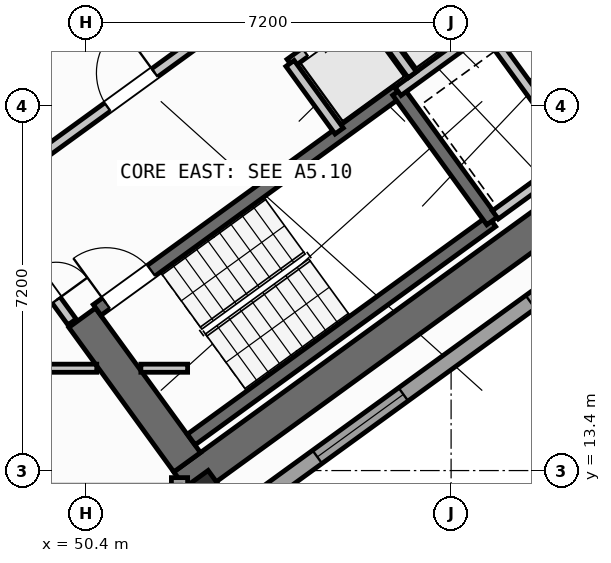
"""IFC4 building model, lengths in metres.
Left out: names, types, materials, properties, quantities, classifications, styles, units other than length and angle.
Written with IfcOpenShell. Run it as: python <this file> out.ifc"""

import sys

from ifc_helpers import new_model, si_unit, direction, frame, frame_2d, origin, origin_2d, place, context, subcontext, project, spatial, rectangle, hollow_rectangle, extrude, source, transform, mapped, element, fill, save


model = new_model("IFC4")
c1 = context("Model", 3, precision=1e-05, world=origin(), true_north=direction((0.0, 1.0)))
c2 = subcontext(c1, "Body", "Model", "MODEL_VIEW")
j1 = project(units=[si_unit("LENGTHUNIT", "METRE"), si_unit("PLANEANGLEUNIT", "RADIAN")], contexts=[c1])
p1 = place(None, origin())
s1 = spatial("IfcSite", under=j1, at=p1, CompositionType="ELEMENT")
p2 = place(p1, origin())
s2 = spatial("IfcBuilding", under=s1, at=p2, CompositionType="ELEMENT")
p3 = place(p2, frame((0.0, 0.0, 90.0)))
s3 = spatial("IfcBuildingStorey", under=s2, at=p3, CompositionType="ELEMENT", Elevation=90.0)
p4 = place(p3, frame((52.318, 13.11, 0.0), z_axis=(0.0, 0.0, 1.0), x_axis=(0.809019445368, 0.587781878776, 0.0)))
e1 = element("IfcWall", 1, at=p4, inside=s3, PredefinedType="SHEAR", context=c2, shape_type="SweptSolid", body=[
    extrude(rectangle(XDim=12.44, YDim=0.65, at=frame_2d((6.22, 0.0))), origin(), (0.0, 0.0, 1.0), 3.35),
])
p5 = place(p3, frame((52.39, 13.564, 0.0), z_axis=(0.0, 0.0, 1.0), x_axis=(-0.58779688989, 0.809008539037, 0.0)))
e2 = element("IfcWall", 2, at=p5, inside=s3, PredefinedType="SHEAR", context=c2, shape_type="SweptSolid", body=[
    extrude(rectangle(XDim=3.525, YDim=0.65, at=frame_2d((1.763, 0.0))), origin(), (0.0, 0.0, 1.0), 3.35),
])
m1 = source(origin(), c2, "Body", "SweptSolid", [
    extrude(hollow_rectangle(XDim=0.9, YDim=0.9, WallThickness=0.036, at=origin_2d()), origin(), (0.0, 0.0, 1.0), 3.6),
])
p6 = place(p3, frame((52.705, 12.773, 0.0), z_axis=(0.0, 0.0, 1.0), x_axis=(0.809016994375, 0.587785252292, 0.0)))
e3 = element("IfcColumn", 3, at=p6, inside=s3, PredefinedType="COLUMN", context=c2, shape_type="MappedRepresentation", body=[
    mapped(m1, transform((0.0, 0.0, 0.0), scale=1.0)),
])
p7 = place(p3, frame((67.454, 22.747, 0.0), z_axis=(0.0, 0.0, 1.0), x_axis=(-0.809021120468, -0.587779573171, 0.0)))
e4 = element("IfcWall", 4, at=p7, inside=s3, PredefinedType="STANDARD", context=c2, shape_type="SweptSolid", body=[
    extrude(rectangle(XDim=17.588, YDim=0.32, at=frame_2d((8.794, 0.0))), origin(), (0.0, 0.0, 1.0), 3.35),
])
p8 = place(p7, frame((1.624, 0.0, 0.0)))
e5 = element("IfcOpeningElement", 5, at=p8, cuts=e4, PredefinedType="OPENING", context=c2, shape_type="SweptSolid", body=[
    extrude(rectangle(XDim=1.05, YDim=2.15, at=frame_2d((0.525, 1.075))), frame((0.0, 0.17, 0.0), z_axis=(0.0, -1.0, 0.0), x_axis=(1.0, 0.0, 0.0)), (0.0, 0.0, 1.0), 0.34),
])
p9 = place(p7, frame((8.144, 0.0, 0.8)))
e6 = element("IfcOpeningElement", 6, at=p9, cuts=e4, PredefinedType="OPENING", context=c2, shape_type="SweptSolid", body=[
    extrude(rectangle(XDim=2.1, YDim=1.55, at=frame_2d((1.05, 0.775))), frame((0.0, 0.17, 0.0), z_axis=(0.0, -1.0, 0.0), x_axis=(1.0, 0.0, 0.0)), (0.0, 0.0, 1.0), 0.34),
])
p10 = place(p7, frame((13.344, 0.0, 0.8)))
e7 = element("IfcOpeningElement", 7, at=p10, cuts=e4, PredefinedType="OPENING", context=c2, shape_type="SweptSolid", body=[
    extrude(rectangle(XDim=2.1, YDim=1.55, at=frame_2d((1.05, 0.775))), frame((0.0, 0.17, 0.0), z_axis=(0.0, -1.0, 0.0), x_axis=(1.0, 0.0, 0.0)), (0.0, 0.0, 1.0), 0.34),
])
p11 = place(p3, frame((52.24, 13.261, 0.0), z_axis=(0.0, 0.0, 1.0), x_axis=(0.0, -1.0, 0.0)))
e8 = element("IfcWall", 8, at=p11, inside=s3, PredefinedType="STANDARD", context=c2, shape_type="SweptSolid", body=[
    extrude(rectangle(XDim=9.795, YDim=0.32, at=frame_2d((4.897, 0.0))), origin(), (0.0, 0.0, 1.0), 3.35),
])
p12 = place(p11, frame((2.307, 0.0, 0.8)))
e9 = element("IfcOpeningElement", 9, at=p12, cuts=e8, PredefinedType="OPENING", context=c2, shape_type="SweptSolid", body=[
    extrude(rectangle(XDim=2.1, YDim=1.55, at=frame_2d((1.05, 0.775))), frame((0.0, 0.17, 0.0), z_axis=(0.0, -1.0, 0.0), x_axis=(1.0, 0.0, 0.0)), (0.0, 0.0, 1.0), 0.34),
])
p13 = place(p11, frame((7.03, 0.0, 0.85)))
e10 = element("IfcOpeningElement", 10, at=p13, cuts=e8, PredefinedType="OPENING", context=c2, shape_type="SweptSolid", body=[
    extrude(rectangle(XDim=1.8, YDim=1.5, at=frame_2d((0.9, 0.75))), frame((0.0, 0.17, 0.0), z_axis=(0.0, -1.0, 0.0), x_axis=(1.0, 0.0, 0.0)), (0.0, 0.0, 1.0), 0.34),
])
p14 = place(p3, frame((52.472, 14.013, 0.0), z_axis=(0.0, 0.0, 1.0), x_axis=(0.809028366311, 0.587769599847, 0.0)))
e11 = element("IfcWall", 11, at=p14, inside=s3, PredefinedType="SHEAR", context=c2, shape_type="SweptSolid", body=[
    extrude(rectangle(XDim=7.33, YDim=0.26, at=frame_2d((3.665, 0.0))), origin(), (0.0, 0.0, 1.0), 3.35),
])
p15 = place(p3, frame((50.615, 16.57, 0.0), z_axis=(0.0, 0.0, 1.0), x_axis=(0.809028366311, 0.587769599847, 0.0)))
e12 = element("IfcWall", 12, at=p15, inside=s3, PredefinedType="SHEAR", context=c2, shape_type="SweptSolid", body=[
    extrude(rectangle(XDim=7.33, YDim=0.26, at=frame_2d((3.665, 0.0))), origin(), (0.0, 0.0, 1.0), 3.35),
])
p16 = place(p15, frame((0.22, 0.0, 0.0)))
e13 = element("IfcOpeningElement", 13, at=p16, cuts=e12, PredefinedType="OPENING", context=c2, shape_type="SweptSolid", body=[
    extrude(rectangle(XDim=1.1, YDim=2.1, at=frame_2d((0.55, 1.05))), frame((0.0, 0.14, 0.0), z_axis=(0.0, -1.0, 0.0), x_axis=(1.0, 0.0, 0.0)), (0.0, 0.0, 1.0), 0.28),
])
p17 = place(p3, frame((58.41, 18.327, 0.0), z_axis=(0.0, 0.0, 1.0), x_axis=(-0.58776738483, 0.809029975545, 0.0)))
e14 = element("IfcWall", 14, at=p17, inside=s3, PredefinedType="SHEAR", context=c2, shape_type="SweptSolid", body=[
    extrude(rectangle(XDim=3.16, YDim=0.26, at=frame_2d((1.58, 0.0))), origin(), (0.0, 0.0, 1.0), 3.35),
])
p18 = place(p3, frame((47.106, 21.437, 0.0), z_axis=(0.0, 0.0, 1.0), x_axis=(0.809012514015, 0.58779141893, 0.0)))
e15 = element("IfcWall", 15, at=p18, inside=s3, PredefinedType="STANDARD", context=c2, shape_type="SweptSolid", body=[
    extrude(rectangle(XDim=3.398, YDim=0.2, at=frame_2d((1.699, 0.0))), origin(), (0.0, 0.0, 1.0), 3.34),
])
p19 = place(p18, frame((0.408, 0.0, 0.0)))
e16 = element("IfcOpeningElement", 16, at=p19, cuts=e15, PredefinedType="OPENING", context=c2, shape_type="SweptSolid", body=[
    extrude(rectangle(XDim=1.3, YDim=2.2, at=frame_2d((0.65, 1.1))), frame((0.0, 0.11, 0.0), z_axis=(0.0, -1.0, 0.0), x_axis=(1.0, 0.0, 0.0)), (0.0, 0.0, 1.0), 0.22),
])
p20 = place(p3, frame((48.799, 19.107, 0.0), z_axis=(0.0, 0.0, 1.0), x_axis=(0.809012959416, 0.587790805897, 0.0)))
e17 = element("IfcWall", 17, at=p20, inside=s3, PredefinedType="STANDARD", context=c2, shape_type="SweptSolid", body=[
    extrude(rectangle(XDim=5.718, YDim=0.2, at=frame_2d((2.859, 0.0))), origin(), (0.0, 0.0, 1.0), 3.34),
])
p21 = place(p20, frame((2.498, 0.0, 0.0)))
e18 = element("IfcOpeningElement", 18, at=p21, cuts=e17, PredefinedType="OPENING", context=c2, shape_type="SweptSolid", body=[
    extrude(rectangle(XDim=1.15, YDim=2.1, at=frame_2d((0.575, 1.05))), frame((0.0, 0.11, 0.0), z_axis=(0.0, -1.0, 0.0), x_axis=(1.0, 0.0, 0.0)), (0.0, 0.0, 1.0), 0.22),
])
p22 = place(p3, frame((56.553, 20.884, 0.0), z_axis=(0.0, 0.0, 1.0), x_axis=(0.809035789462, 0.587759382205, 0.0)))
e19 = element("IfcWall", 19, at=p22, inside=s3, PredefinedType="STANDARD", context=c2, shape_type="SweptSolid", body=[
    extrude(rectangle(XDim=3.768, YDim=0.2, at=frame_2d((1.884, 0.0))), origin(), (0.0, 0.0, 1.0), 3.34),
])
p23 = place(p22, frame((2.65, 0.0, 0.0)))
e20 = element("IfcOpeningElement", 20, at=p23, cuts=e19, PredefinedType="OPENING", context=c2, shape_type="SweptSolid", body=[
    extrude(rectangle(XDim=0.86, YDim=2.05, at=frame_2d((0.43, 1.025))), frame((0.0, 0.11, 0.0), z_axis=(0.0, -1.0, 0.0), x_axis=(1.0, 0.0, 0.0)), (0.0, 0.0, 1.0), 0.22),
])
p24 = place(p3, frame((54.421, 21.436, 0.0), z_axis=(0.0, 0.0, 1.0), x_axis=(0.809013710463, 0.587789772183, 0.0)))
e21 = element("IfcWall", 21, at=p24, inside=s3, PredefinedType="STANDARD", context=c2, shape_type="SweptSolid", body=[
    extrude(rectangle(XDim=5.36, YDim=0.2, at=frame_2d((2.68, 0.0))), origin(), (0.0, 0.0, 1.0), 3.34),
])
p25 = place(p24, frame((0.37, 0.0, 0.0)))
e22 = element("IfcOpeningElement", 22, at=p25, cuts=e21, PredefinedType="OPENING", context=c2, shape_type="SweptSolid", body=[
    extrude(rectangle(XDim=1.1, YDim=2.15, at=frame_2d((0.55, 1.075))), frame((0.0, 0.11, 0.0), z_axis=(0.0, -1.0, 0.0), x_axis=(1.0, 0.0, 0.0)), (0.0, 0.0, 1.0), 0.22),
])
p26 = place(p24, frame((2.17, 0.0, 0.0)))
e23 = element("IfcOpeningElement", 23, at=p26, cuts=e21, PredefinedType="OPENING", context=c2, shape_type="SweptSolid", body=[
    extrude(rectangle(XDim=1.1, YDim=2.15, at=frame_2d((0.55, 1.075))), frame((0.0, 0.11, 0.0), z_axis=(0.0, -1.0, 0.0), x_axis=(1.0, 0.0, 0.0)), (0.0, 0.0, 1.0), 0.22),
])
p27 = place(p24, frame((3.97, 0.0, 0.0)))
e24 = element("IfcOpeningElement", 24, at=p27, cuts=e21, PredefinedType="OPENING", context=c2, shape_type="SweptSolid", body=[
    extrude(rectangle(XDim=1.1, YDim=2.15, at=frame_2d((0.55, 1.075))), frame((0.0, 0.11, 0.0), z_axis=(0.0, -1.0, 0.0), x_axis=(1.0, 0.0, 0.0)), (0.0, 0.0, 1.0), 0.22),
])
p28 = place(p3, frame((55.391, 20.102, 0.0), z_axis=(0.0, 0.0, 1.0), x_axis=(-0.58778447739, 0.809017557374, 0.0)))
e25 = element("IfcWall", 25, at=p28, inside=s3, PredefinedType="STANDARD", context=c2, shape_type="SweptSolid", body=[
    extrude(rectangle(XDim=1.65, YDim=0.2, at=frame_2d((0.825, 0.0))), origin(), (0.0, 0.0, 1.0), 3.34),
])
p29 = place(p3, frame((56.834, 21.212, 0.0), z_axis=(0.0, 0.0, 1.0), x_axis=(-0.58776738483, 0.809029975545, 0.0)))
e26 = element("IfcWall", 26, at=p29, inside=s3, PredefinedType="STANDARD", context=c2, shape_type="SweptSolid", body=[
    extrude(rectangle(XDim=1.58, YDim=0.2, at=frame_2d((0.79, 0.0))), origin(), (0.0, 0.0, 1.0), 3.34),
])
p30 = place(p3, frame((60.067, 19.655, 0.0), z_axis=(0.0, 0.0, 1.0), x_axis=(-0.587800520745, 0.809005900975, 0.0)))
e27 = element("IfcWall", 27, at=p30, inside=s3, PredefinedType="STANDARD", context=c2, shape_type="SweptSolid", body=[
    extrude(rectangle(XDim=2.66, YDim=0.2, at=frame_2d((1.33, 0.0))), origin(), (0.0, 0.0, 1.0), 3.34),
])
p31 = place(p3, frame((58.472, 18.447, 0.0), z_axis=(0.0, 0.0, 1.0), x_axis=(0.809022487728, 0.587777691266, 0.0)))
e28 = element("IfcWall", 28, at=p31, inside=s3, PredefinedType="STANDARD", context=c2, shape_type="SweptSolid", body=[
    extrude(rectangle(XDim=3.648, YDim=0.2, at=frame_2d((1.824, 0.0))), origin(), (0.0, 0.0, 1.0), 3.34),
])
p32 = place(p3, frame((35.296, 15.42, 0.0), z_axis=(0.0, 0.0, 1.0), x_axis=(1.0, 0.0, 0.0)))
e29 = element("IfcWall", 29, at=p32, inside=s3, PredefinedType="PARTITIONING", context=c2, shape_type="SweptSolid", body=[
    extrude(rectangle(XDim=15.311, YDim=0.16, at=frame_2d((7.655, 0.0))), origin(), (0.0, 0.0, 1.0), 3.34),
])
p33 = place(p32, frame((0.615, 0.0, 0.0)))
e30 = element("IfcOpeningElement", 30, at=p33, cuts=e29, PredefinedType="OPENING", context=c2, shape_type="SweptSolid", body=[
    extrude(rectangle(XDim=1.0, YDim=2.1, at=frame_2d((0.5, 1.05))), frame((0.0, 0.09, 0.0), z_axis=(0.0, -1.0, 0.0), x_axis=(1.0, 0.0, 0.0)), (0.0, 0.0, 1.0), 0.18),
])
p34 = place(p32, frame((9.035, 0.0, 0.0)))
e31 = element("IfcOpeningElement", 31, at=p34, cuts=e29, PredefinedType="OPENING", context=c2, shape_type="SweptSolid", body=[
    extrude(rectangle(XDim=1.0, YDim=2.1, at=frame_2d((0.5, 1.05))), frame((0.0, 0.09, 0.0), z_axis=(0.0, -1.0, 0.0), x_axis=(1.0, 0.0, 0.0)), (0.0, 0.0, 1.0), 0.18),
])
p35 = place(p3, frame((51.477, 15.42, 0.0), z_axis=(0.0, 0.0, 1.0), x_axis=(1.0, 0.0, 0.0)))
e32 = element("IfcWall", 32, at=p35, inside=s3, PredefinedType="PARTITIONING", context=c2, shape_type="SweptSolid", body=[
    extrude(rectangle(XDim=0.923, YDim=0.16, at=frame_2d((0.461, 0.0))), origin(), (0.0, 0.0, 1.0), 3.34),
])
p36 = place(p3, frame((50.119, 16.333, 0.0), z_axis=(0.0, 0.0, 1.0), x_axis=(-0.587749856981, 0.809042709391, 0.0)))
e33 = element("IfcWall", 33, at=p36, inside=s3, PredefinedType="STANDARD", context=c2, shape_type="SweptSolid", body=[
    extrude(rectangle(XDim=2.96, YDim=0.2, at=frame_2d((1.48, 0.0))), origin(), (0.0, 0.0, 1.0), 3.34),
])
p37 = place(p36, frame((0.53, 0.0, 0.0)))
e34 = element("IfcOpeningElement", 34, at=p37, cuts=e33, PredefinedType="OPENING", context=c2, shape_type="SweptSolid", body=[
    extrude(rectangle(XDim=1.5, YDim=2.15, at=frame_2d((0.75, 1.075))), frame((0.0, 0.11, 0.0), z_axis=(0.0, -1.0, 0.0), x_axis=(1.0, 0.0, 0.0)), (0.0, 0.0, 1.0), 0.22),
])
m2 = source(origin(), c2, "Body", "SweptSolid", [
    extrude(rectangle(XDim=2.1, YDim=1.55, at=frame_2d((1.05, 0.775))), frame((0.0, 0.03, 0.0), z_axis=(0.0, -1.0, 0.0), x_axis=(1.0, 0.0, 0.0)), (0.0, 0.0, 1.0), 0.06),
])
p38 = place(p9, origin())
e35 = element("IfcWindow", 35, at=p38, inside=s3, PartitioningType="SINGLE_PANEL", PredefinedType="WINDOW", context=c2, shape_type="MappedRepresentation", body=[
    mapped(m2, transform((0.0, 0.0, 0.0), scale=1.0)),
])
fill(e6, e35)
p39 = place(p10, origin())
e36 = element("IfcWindow", 36, at=p39, inside=s3, PartitioningType="SINGLE_PANEL", PredefinedType="WINDOW", context=c2, shape_type="MappedRepresentation", body=[
    mapped(m2, transform((0.0, 0.0, 0.0), scale=1.0)),
])
fill(e7, e36)
m3 = source(origin(), c2, "Body", "SweptSolid", [
    extrude(rectangle(XDim=1.1, YDim=2.1, at=frame_2d((0.55, 1.05))), frame((0.0, 0.025, 0.0), z_axis=(0.0, -1.0, 0.0), x_axis=(1.0, 0.0, 0.0)), (0.0, 0.0, 1.0), 0.05),
])
p40 = place(p16, origin())
e37 = element("IfcDoor", 37, at=p40, inside=s3, OperationType="SINGLE_SWING_LEFT", PredefinedType="DOOR", context=c2, shape_type="MappedRepresentation", body=[
    mapped(m3, transform((0.0, 0.0, 0.0), scale=1.0)),
])
fill(e13, e37)
m4 = source(origin(), c2, "Body", "SweptSolid", [
    extrude(rectangle(XDim=1.15, YDim=2.1, at=frame_2d((0.575, 1.05))), frame((0.0, 0.025, 0.0), z_axis=(0.0, -1.0, 0.0), x_axis=(1.0, 0.0, 0.0)), (0.0, 0.0, 1.0), 0.05),
])
p41 = place(p21, origin())
e38 = element("IfcDoor", 38, at=p41, inside=s3, OperationType="SINGLE_SWING_RIGHT", PredefinedType="DOOR", context=c2, shape_type="MappedRepresentation", body=[
    mapped(m4, transform((0.0, 0.0, 0.0), scale=1.0)),
])
fill(e18, e38)
m5 = source(origin(), c2, "Body", "SweptSolid", [
    extrude(rectangle(XDim=1.1, YDim=2.15, at=frame_2d((0.55, 1.075))), frame((0.0, 0.025, 0.0), z_axis=(0.0, -1.0, 0.0), x_axis=(1.0, 0.0, 0.0)), (0.0, 0.0, 1.0), 0.05),
])
p42 = place(p25, origin())
e39 = element("IfcDoor", 39, at=p42, inside=s3, OperationType="DOUBLE_DOOR_SLIDING", PredefinedType="DOOR", context=c2, shape_type="MappedRepresentation", body=[
    mapped(m5, transform((0.0, 0.0, 0.0), scale=1.0)),
])
fill(e22, e39)
m6 = source(origin(), c2, "Body", "SweptSolid", [
    extrude(rectangle(XDim=1.5, YDim=2.15, at=frame_2d((0.75, 1.075))), frame((0.0, 0.025, 0.0), z_axis=(0.0, -1.0, 0.0), x_axis=(1.0, 0.0, 0.0)), (0.0, 0.0, 1.0), 0.05),
])
p43 = place(p37, frame((1.5, 0.0, 0.0), z_axis=(0.0, 0.0, 1.0), x_axis=(-1.0, 0.0, 0.0)))
e40 = element("IfcDoor", 40, at=p43, inside=s3, OperationType="DOUBLE_DOOR_SINGLE_SWING", PredefinedType="DOOR", context=c2, shape_type="MappedRepresentation", body=[
    mapped(m6, transform((0.0, 0.0, 0.0), scale=1.0)),
])
fill(e34, e40)
save(model, sys.argv[1])
